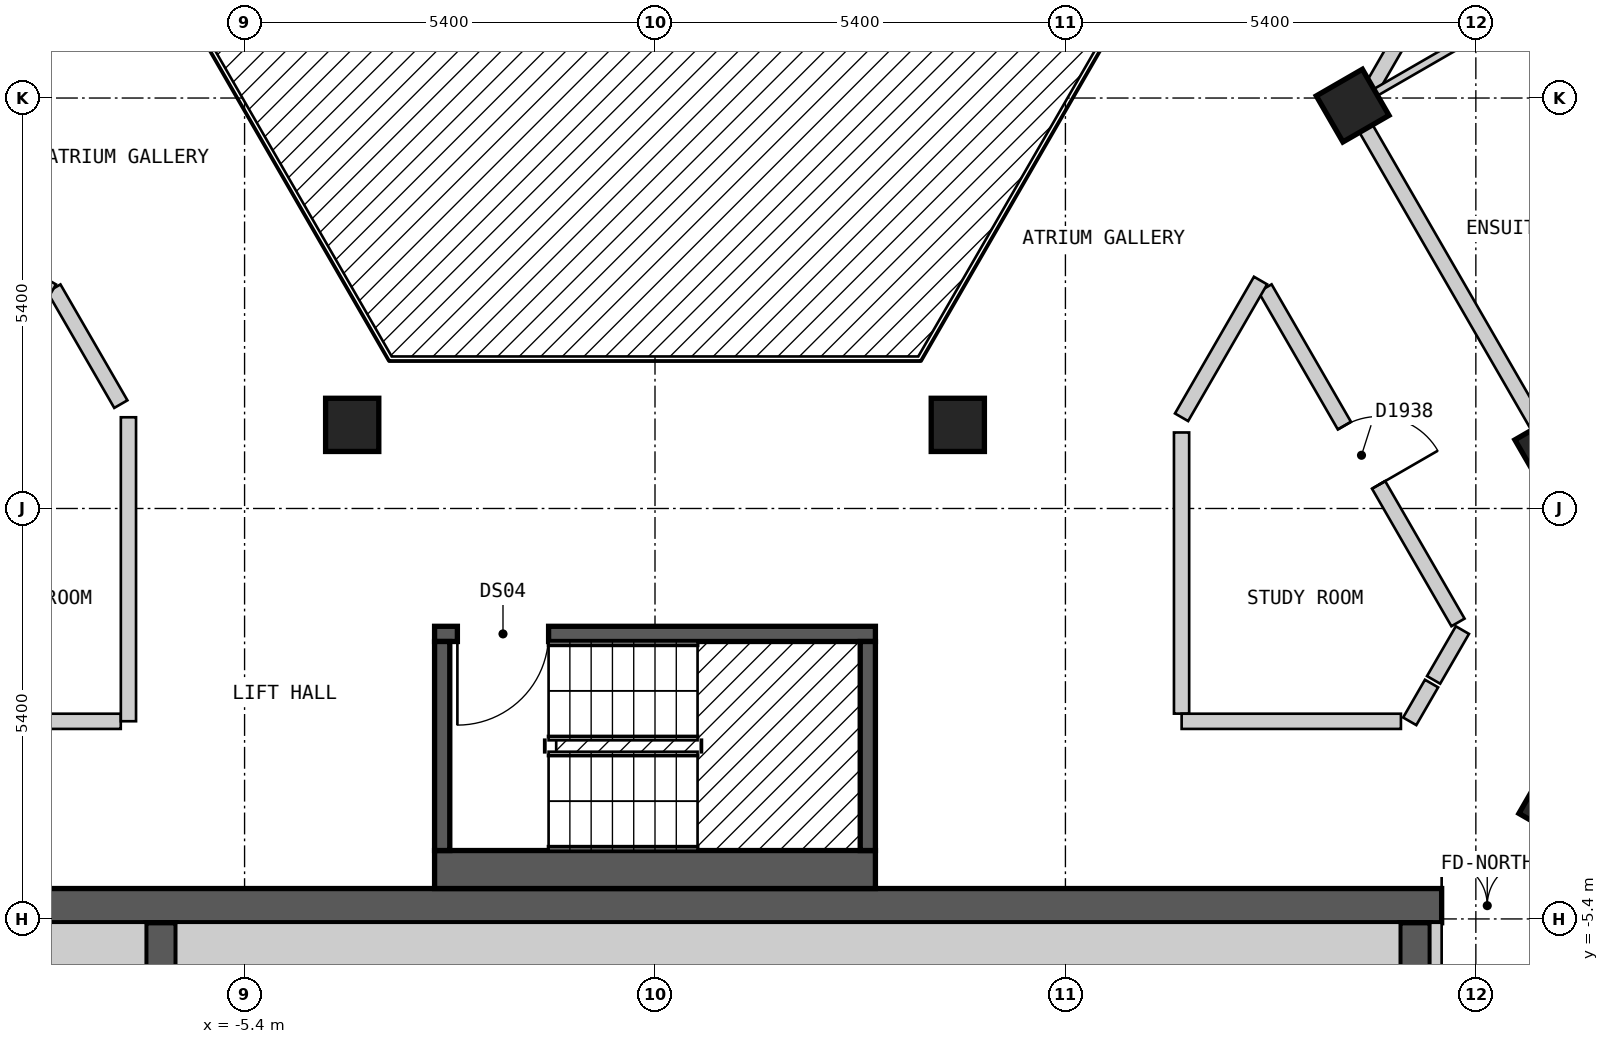
"""IFC4 building model, lengths in metres.
Left out: names, types, materials, properties, quantities, classifications, styles, units other than length and angle.
Written with IfcOpenShell. Run it as: python <this file> out.ifc"""

import sys

from ifc_helpers import new_model, si_unit, direction, frame, frame_2d, origin, origin_2d, place, context, subcontext, project, spatial, rectangle, extrude, element, fill, save


model = new_model("IFC4")
c1 = context("Model", 3, precision=1e-05, world=origin(), true_north=direction((0.0, 1.0)))
c2 = subcontext(c1, "Body", "Model", "MODEL_VIEW")
j1 = project(units=[si_unit("LENGTHUNIT", "METRE"), si_unit("PLANEANGLEUNIT", "RADIAN")], contexts=[c1])
p1 = place(None, origin())
s1 = spatial("IfcSite", under=j1, at=p1, CompositionType="ELEMENT")
p2 = place(p1, origin())
s2 = spatial("IfcBuilding", under=s1, at=p2, CompositionType="ELEMENT")
p3 = place(p2, frame((0.0, 0.0, 220.8)))
s3 = spatial("IfcBuildingStorey", under=s2, at=p3, CompositionType="ELEMENT", Elevation=220.8)
for number, where, z_axis, x_axis in (
    (1, (11.845, -3.884, 0.0), (0.0, 0.0, 1.0), (0.5, 0.866, 0.0)),
    (2, (11.792, 0.775, 0.0), (0.0, 0.0, 1.0), (-0.5, 0.866, 0.0)),
    (3, (3.984, 1.1, 0.0), (0.0, 0.0, 1.0), (1.0, 0.0, 0.0)),
    (4, (9.179, 5.3, 0.0), (0.0, 0.0, 1.0), (-0.5, 0.866, 0.0)),
    (5, (-3.984, 1.1, 0.0), (0.0, 0.0, 1.0), (1.0, 0.0, 0.0)),
):
    element("IfcColumn", number, at=place(p3, frame(where, z_axis=z_axis, x_axis=x_axis)), inside=s3, PredefinedType="COLUMN", context=c2, shape_type="SweptSolid", body=[
        extrude(rectangle(XDim=0.7, YDim=0.7, at=origin_2d()), origin(), (0.0, 0.0, 1.0), 3.0),
    ])
p4 = place(p3, frame((-13.3, -5.225, 0.0), z_axis=(0.0, 0.0, 1.0), x_axis=(1.0, 0.0, 0.0)))
e6 = element("IfcWall", 6, at=p4, inside=s3, PredefinedType="SHEAR", context=c2, shape_type="SweptSolid", body=[
    extrude(rectangle(XDim=26.6, YDim=0.45, at=frame_2d((13.3, 0.0))), origin(), (0.0, 0.0, 1.0), 2.7),
])
p5 = place(p4, frame((23.65, 0.0, 0.0)))
e7 = element("IfcOpeningElement", 7, at=p5, cuts=e6, PredefinedType="OPENING", context=c2, shape_type="SweptSolid", body=[
    extrude(rectangle(XDim=1.2, YDim=2.1, at=frame_2d((0.6, 1.05))), frame((0.0, 0.235, 0.0), z_axis=(0.0, -1.0, 0.0), x_axis=(1.0, 0.0, 0.0)), (0.0, 0.0, 1.0), 0.47),
])
for number, where, z_axis, x_axis in (
    (8, (-6.5, -9.15, 0.0), (0.0, 0.0, 1.0), (0.0, 1.0, 0.0)),
    (9, (10.0, -9.15, 0.0), (0.0, 0.0, 1.0), (0.0, 1.0, 0.0)),
):
    element("IfcWall", number, at=place(p3, frame(where, z_axis=z_axis, x_axis=x_axis)), inside=s3, PredefinedType="SHEAR", context=c2, shape_type="SweptSolid", body=[
        extrude(rectangle(XDim=3.7, YDim=0.4, at=frame_2d((1.85, 0.0))), origin(), (0.0, 0.0, 1.0), 2.7),
    ])
p6 = place(p3, frame((-2.9, -4.75, 0.0), z_axis=(0.0, 0.0, 1.0), x_axis=(1.0, 0.0, 0.0)))
e10 = element("IfcWall", 10, at=p6, inside=s3, PredefinedType="SOLIDWALL", context=c2, shape_type="SweptSolid", body=[
    extrude(rectangle(XDim=5.8, YDim=0.5, at=frame_2d((2.9, 0.0))), origin(), (0.0, 0.0, 1.0), 2.7),
])
p7 = place(p3, frame((-2.9, -1.65, 0.0), z_axis=(0.0, 0.0, 1.0), x_axis=(1.0, 0.0, 0.0)))
e11 = element("IfcWall", 11, at=p7, inside=s3, PredefinedType="SOLIDWALL", context=c2, shape_type="SweptSolid", body=[
    extrude(rectangle(XDim=5.8, YDim=0.2, at=frame_2d((2.9, 0.0))), origin(), (0.0, 0.0, 1.0), 2.7),
])
p8 = place(p7, frame((0.3, 0.0, 0.0)))
e12 = element("IfcOpeningElement", 12, at=p8, cuts=e11, PredefinedType="OPENING", context=c2, shape_type="SweptSolid", body=[
    extrude(rectangle(XDim=1.2, YDim=2.1, at=frame_2d((0.6, 1.05))), frame((0.0, 0.11, 0.0), z_axis=(0.0, -1.0, 0.0), x_axis=(1.0, 0.0, 0.0)), (0.0, 0.0, 1.0), 0.22),
])
for number, where, z_axis, x_axis in (
    (13, (-2.8, -4.5, 0.0), (0.0, 0.0, 1.0), (0.0, 1.0, 0.0)),
    (14, (2.8, -4.5, 0.0), (0.0, 0.0, 1.0), (0.0, 1.0, 0.0)),
):
    element("IfcWall", number, at=place(p3, frame(where, z_axis=z_axis, x_axis=x_axis)), inside=s3, PredefinedType="SOLIDWALL", context=c2, shape_type="SweptSolid", body=[
        extrude(rectangle(XDim=2.75, YDim=0.2, at=frame_2d((1.375, 0.0))), origin(), (0.0, 0.0, 1.0), 2.7),
    ])
p9 = place(p3, frame((-7.909, 2.898, 0.0), z_axis=(0.0, 0.0, 1.0), x_axis=(0.50019444547, -0.865913111531, 0.0)))
e15 = element("IfcWall", 15, at=p9, inside=s3, PredefinedType="PARTITIONING", context=c2, shape_type="SweptSolid", body=[
    extrude(rectangle(XDim=1.761, YDim=0.2, at=frame_2d((0.88, 0.0))), origin(), (0.0, 0.0, 1.0), 2.7),
])
p10 = place(p3, frame((8.026, 2.899, 0.0), z_axis=(0.0, 0.0, 1.0), x_axis=(0.499986018985, -0.866033475577, 0.0)))
e16 = element("IfcWall", 16, at=p10, inside=s3, PredefinedType="PARTITIONING", context=c2, shape_type="SweptSolid", body=[
    extrude(rectangle(XDim=5.078, YDim=0.2, at=frame_2d((2.539, 0.0))), origin(), (0.0, 0.0, 1.0), 2.7),
])
p11 = place(p10, frame((2.089, 0.0, 0.0)))
e17 = element("IfcOpeningElement", 17, at=p11, cuts=e16, PredefinedType="OPENING", context=c2, shape_type="SweptSolid", body=[
    extrude(rectangle(XDim=0.9, YDim=2.1, at=frame_2d((0.45, 1.05))), frame((0.0, 0.11, 0.0), z_axis=(0.0, -1.0, 0.0), x_axis=(1.0, 0.0, 0.0)), (0.0, 0.0, 1.0), 0.22),
])
p12 = place(p3, frame((9.238, 5.2, 0.0), z_axis=(0.0, 0.0, 1.0), x_axis=(0.500025705601, -0.86601056214, 0.0)))
e18 = element("IfcWall", 18, at=p12, inside=s3, PredefinedType="PARTITIONING", context=c2, shape_type="SweptSolid", body=[
    extrude(rectangle(XDim=7.735, YDim=0.2, at=frame_2d((3.868, 0.0))), origin(), (0.0, 0.0, 1.0), 2.7),
])
p13 = place(p3, frame((6.928, 1.0, 0.0), z_axis=(0.0, 0.0, 1.0), x_axis=(0.0, -1.0, 0.0)))
e19 = element("IfcWall", 19, at=p13, inside=s3, PredefinedType="PARTITIONING", context=c2, shape_type="SweptSolid", body=[
    extrude(rectangle(XDim=3.699, YDim=0.2, at=frame_2d((1.85, 0.0))), origin(), (0.0, 0.0, 1.0), 2.7),
])
p14 = place(p3, frame((-9.93, -2.8, 0.0), z_axis=(0.0, 0.0, 1.0), x_axis=(1.0, 0.0, 0.0)))
e20 = element("IfcWall", 20, at=p14, inside=s3, PredefinedType="PARTITIONING", context=c2, shape_type="SweptSolid", body=[
    extrude(rectangle(XDim=2.901, YDim=0.2, at=frame_2d((1.45, 0.0))), origin(), (0.0, 0.0, 1.0), 2.7),
])
p15 = place(p3, frame((6.929, -2.8, 0.0), z_axis=(0.0, 0.0, 1.0), x_axis=(1.0, 0.0, 0.0)))
e21 = element("IfcWall", 21, at=p15, inside=s3, PredefinedType="PARTITIONING", context=c2, shape_type="SweptSolid", body=[
    extrude(rectangle(XDim=2.885, YDim=0.2, at=frame_2d((1.442, 0.0))), origin(), (0.0, 0.0, 1.0), 2.7),
])
p16 = place(p3, frame((6.928, 1.2, 0.0), z_axis=(0.0, 0.0, 1.0), x_axis=(0.500132712588, 0.865948768577, 0.0)))
e22 = element("IfcWall", 22, at=p16, inside=s3, PredefinedType="PARTITIONING", context=c2, shape_type="SweptSolid", body=[
    extrude(rectangle(XDim=2.078, YDim=0.2, at=frame_2d((1.039, 0.0))), origin(), (0.0, 0.0, 1.0), 2.7),
])
p17 = place(p3, frame((9.404, 5.487, 0.0), z_axis=(0.0, 0.0, 1.0), x_axis=(0.499768590677, 0.866158966803, 0.0)))
e23 = element("IfcWall", 23, at=p17, inside=s3, PredefinedType="PARTITIONING", context=c2, shape_type="SweptSolid", body=[
    extrude(rectangle(XDim=2.901, YDim=0.2, at=frame_2d((1.451, 0.0))), origin(), (0.0, 0.0, 1.0), 2.7),
])
p18 = place(p3, frame((9.93, -2.8, 0.0), z_axis=(0.0, 0.0, 1.0), x_axis=(0.500164219654, 0.865930570761, 0.0)))
e24 = element("IfcWall", 24, at=p18, inside=s3, PredefinedType="PARTITIONING", context=c2, shape_type="SweptSolid", body=[
    extrude(rectangle(XDim=0.574, YDim=0.2, at=frame_2d((0.287, 0.0))), origin(), (0.0, 0.0, 1.0), 2.7),
])
p19 = place(p3, frame((10.244, -2.255, 0.0), z_axis=(0.0, 0.0, 1.0), x_axis=(0.50109986513, 0.865389464442, 0.0)))
e25 = element("IfcWall", 25, at=p19, inside=s3, PredefinedType="PARTITIONING", context=c2, shape_type="SweptSolid", body=[
    extrude(rectangle(XDim=0.757, YDim=0.2, at=frame_2d((0.378, 0.0))), origin(), (0.0, 0.0, 1.0), 2.7),
])
p20 = place(p3, frame((-10.623, -1.6, 0.0), z_axis=(0.0, 0.0, 1.0), x_axis=(0.500040865889, 0.866001808567, 0.0)))
e26 = element("IfcWall", 26, at=p20, inside=s3, PredefinedType="PARTITIONING", context=c2, shape_type="SweptSolid", body=[
    extrude(rectangle(XDim=5.31, YDim=0.2, at=frame_2d((2.655, 0.0))), origin(), (0.0, 0.0, 1.0), 2.7),
])
p21 = place(p20, frame((2.205, 0.0, 0.0)))
e27 = element("IfcOpeningElement", 27, at=p21, cuts=e26, PredefinedType="OPENING", context=c2, shape_type="SweptSolid", body=[
    extrude(rectangle(XDim=0.9, YDim=2.1, at=frame_2d((0.45, 1.05))), frame((0.0, 0.11, 0.0), z_axis=(0.0, -1.0, 0.0), x_axis=(1.0, 0.0, 0.0)), (0.0, 0.0, 1.0), 0.22),
])
p22 = place(p3, frame((-6.928, -2.799, 0.0), z_axis=(0.0, 0.0, 1.0), x_axis=(0.0, 1.0, 0.0)))
e28 = element("IfcWall", 28, at=p22, inside=s3, PredefinedType="PARTITIONING", context=c2, shape_type="SweptSolid", body=[
    extrude(rectangle(XDim=3.999, YDim=0.2, at=frame_2d((2.0, 0.0))), origin(), (0.0, 0.0, 1.0), 2.7),
])
p23 = place(p3, frame((9.354, 5.401, 0.0), z_axis=(0.0, 0.0, 1.0), x_axis=(0.866018411306, 0.500012111133, 0.0)))
e29 = element("IfcWall", 29, at=p23, inside=s3, PredefinedType="PARTITIONING", context=c2, shape_type="SweptSolid", body=[
    extrude(rectangle(XDim=9.898, YDim=0.1, at=frame_2d((4.949, 0.0))), origin(), (0.0, 0.0, 1.0), 2.7),
])
p24 = place(p23, frame((7.277, 0.0, 0.0)))
e30 = element("IfcOpeningElement", 30, at=p24, cuts=e29, PredefinedType="OPENING", context=c2, shape_type="SweptSolid", body=[
    extrude(rectangle(XDim=0.9, YDim=2.1, at=frame_2d((0.45, 1.05))), frame((0.0, 0.06, 0.0), z_axis=(0.0, -1.0, 0.0), x_axis=(1.0, 0.0, 0.0)), (0.0, 0.0, 1.0), 0.12),
])
p25 = place(p3, frame((-12.1, -5.825, 0.0), z_axis=(0.0, 0.0, 1.0), x_axis=(1.0, 0.0, 0.0)))
e31 = element("IfcWall", 31, at=p25, inside=s3, PredefinedType="SOLIDWALL", context=c2, shape_type="SweptSolid", body=[
    extrude(rectangle(XDim=5.4, YDim=0.75, at=frame_2d((2.7, 0.0))), origin(), (0.0, 0.0, 1.0), 2.7),
])
p26 = place(p3, frame((-6.3, -5.825, 0.0), z_axis=(0.0, 0.0, 1.0), x_axis=(1.0, 0.0, 0.0)))
e32 = element("IfcWall", 32, at=p26, inside=s3, PredefinedType="SOLIDWALL", context=c2, shape_type="SweptSolid", body=[
    extrude(rectangle(XDim=16.1, YDim=0.75, at=frame_2d((8.05, 0.0))), origin(), (0.0, 0.0, 1.0), 2.7),
])
p27 = place(p3, frame((10.275, -6.2, 0.0), z_axis=(0.0, 0.0, 1.0), x_axis=(0.0, 1.0, 0.0)))
e33 = element("IfcWall", 33, at=p27, inside=s3, PredefinedType="PARTITIONING", context=c2, shape_type="SweptSolid", body=[
    extrude(rectangle(XDim=0.75, YDim=0.15, at=frame_2d((0.375, 0.0))), origin(), (0.0, 0.0, 1.0), 2.7),
])
p28 = place(p8, origin())
e34 = element("IfcDoor", 34, at=p28, inside=s3, OperationType="SINGLE_SWING_LEFT", PredefinedType="DOOR", context=c2, shape_type="SweptSolid", body=[
    extrude(rectangle(XDim=1.2, YDim=2.1, at=frame_2d((0.6, 1.05))), frame((0.0, 0.025, 0.0), z_axis=(0.0, -1.0, 0.0), x_axis=(1.0, 0.0, 0.0)), (0.0, 0.0, 1.0), 0.05),
])
fill(e12, e34)
p29 = place(p11, origin())
e35 = element("IfcDoor", 35, at=p29, inside=s3, OperationType="SINGLE_SWING_RIGHT", PredefinedType="DOOR", context=c2, shape_type="SweptSolid", body=[
    extrude(rectangle(XDim=0.9, YDim=2.1, at=frame_2d((0.45, 1.05))), frame((0.0, 0.025, 0.0), z_axis=(0.0, -1.0, 0.0), x_axis=(1.0, 0.0, 0.0)), (0.0, 0.0, 1.0), 0.05),
])
fill(e17, e35)
p30 = place(p5, origin())
e36 = element("IfcDoor", 36, at=p30, inside=s3, OperationType="DOUBLE_DOOR_SINGLE_SWING", PredefinedType="DOOR", context=c2, shape_type="SweptSolid", body=[
    extrude(rectangle(XDim=1.2, YDim=2.1, at=frame_2d((0.6, 1.05))), frame((0.0, 0.025, 0.0), z_axis=(0.0, -1.0, 0.0), x_axis=(1.0, 0.0, 0.0)), (0.0, 0.0, 1.0), 0.05),
])
fill(e7, e36)
save(model, sys.argv[1])
